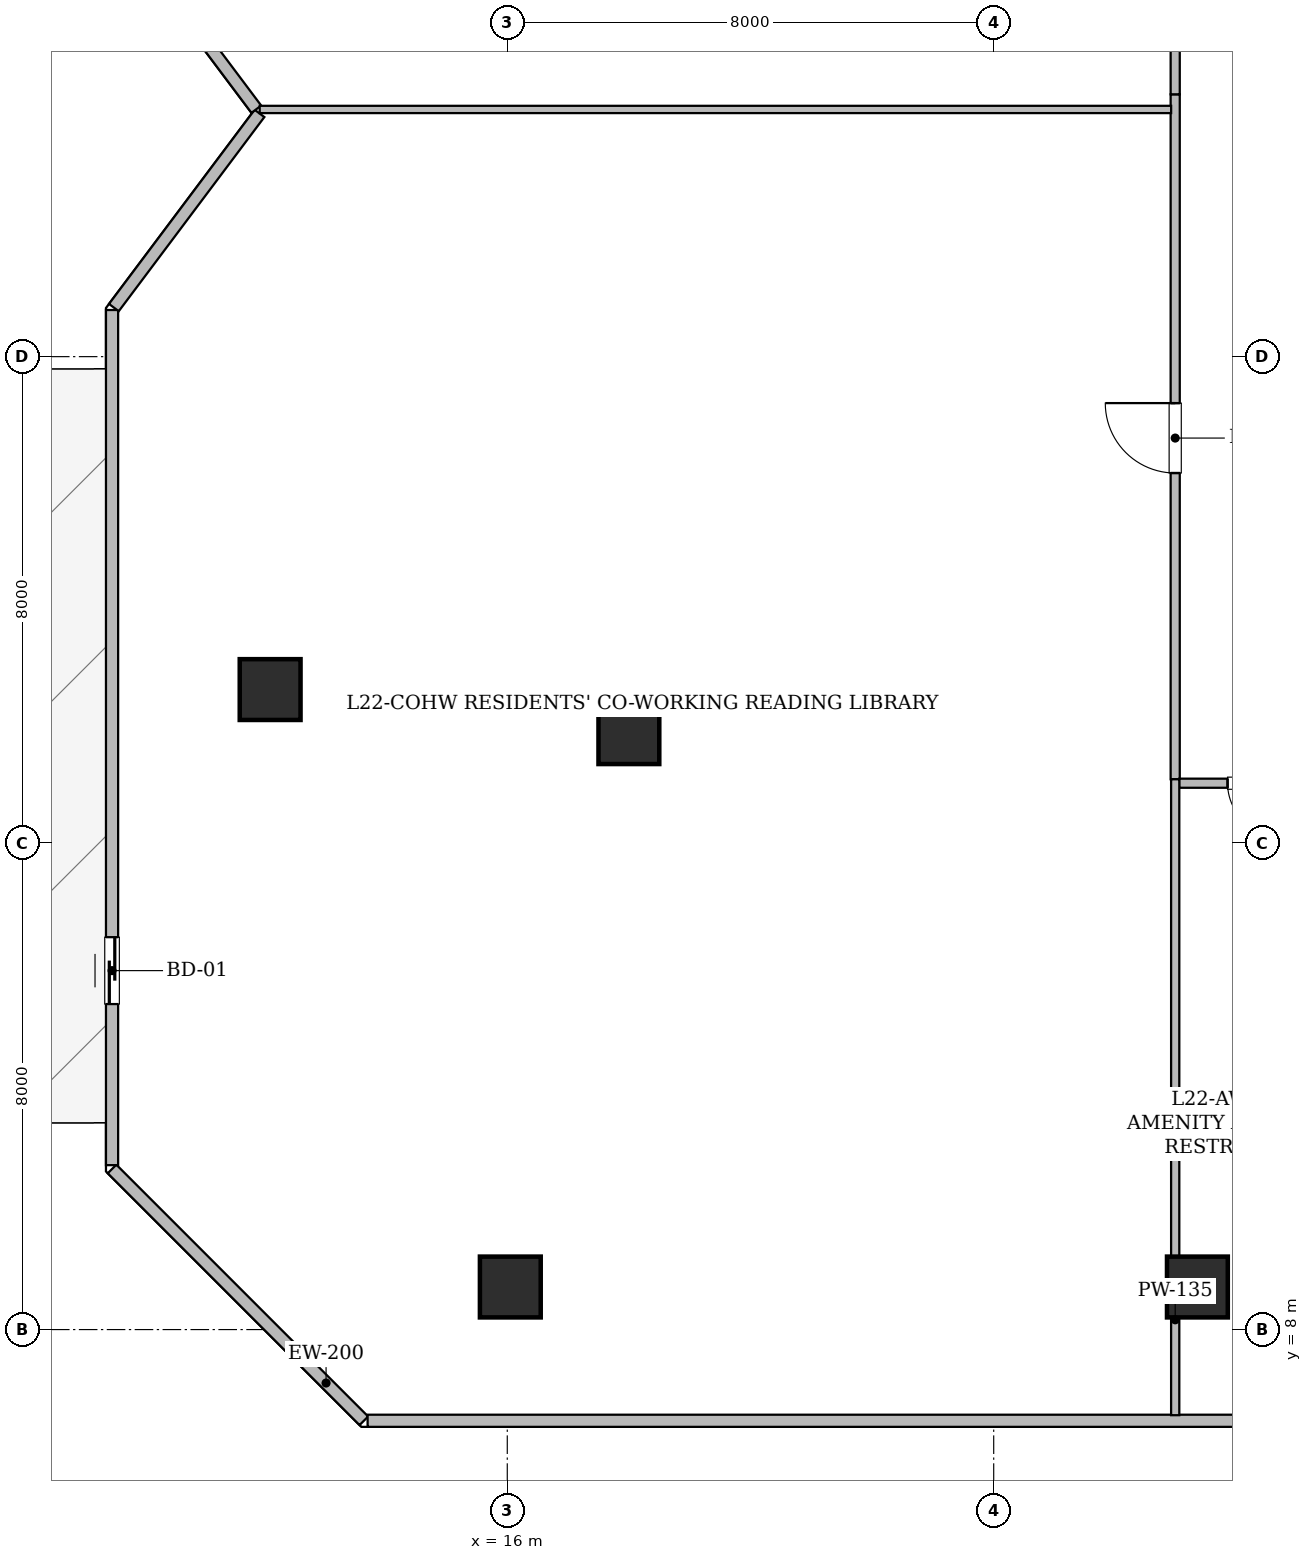
"""IFC4 building model, lengths in metres.
Left out: names, types, materials, properties, quantities, classifications, styles, units other than length and angle.
Written with IfcOpenShell. Run it as: python <this file> out.ifc"""

import sys

from ifc_helpers import new_model, si_unit, direction, frame, frame_2d, origin, origin_2d, place, context, subcontext, project, spatial, rectangle, hollow_rectangle, extrude, element, fill, save


model = new_model("IFC4")
c1 = context("Model", 3, precision=1e-05, world=origin(), true_north=direction((0.0, 1.0)))
c2 = subcontext(c1, "Body", "Model", "MODEL_VIEW")
j1 = project(units=[si_unit("LENGTHUNIT", "METRE"), si_unit("PLANEANGLEUNIT", "RADIAN")], contexts=[c1])
p1 = place(None, origin())
s1 = spatial("IfcSite", under=j1, at=p1, CompositionType="ELEMENT")
p2 = place(p1, origin())
s2 = spatial("IfcBuilding", under=s1, at=p2, CompositionType="ELEMENT")
p3 = place(p2, frame((0.0, 0.0, 89.8)))
s3 = spatial("IfcBuildingStorey", under=s2, at=p3, CompositionType="ELEMENT", Elevation=89.8)
for number, where, z_axis, x_axis in (
    (1, (16.05, 8.7, 0.025), (0.0, 0.0, 1.0), (1.0, 0.0, 0.0)),
    (2, (27.35, 8.7, 0.025), (0.0, 0.0, 1.0), (1.0, 0.0, 0.0)),
    (3, (12.1, 18.525, 0.025), (0.0, 0.0, 1.0), (1.0, 0.0, 0.0)),
):
    element("IfcColumn", number, at=place(p3, frame(where, z_axis=z_axis, x_axis=x_axis)), inside=s3, PredefinedType="COLUMN", context=c2, shape_type="SweptSolid", body=[
        extrude(hollow_rectangle(XDim=1.0, YDim=1.0, WallThickness=0.05, at=origin_2d()), origin(), (0.0, 0.0, 1.0), 4.775),
    ])
p4 = place(p3, frame((18.0, 17.8, 0.0), z_axis=(0.0, 0.0, 1.0), x_axis=(1.0, 0.0, 0.0)))
e4 = element("IfcColumn", 4, at=p4, inside=s3, PredefinedType="COLUMN", context=c2, shape_type="SweptSolid", body=[
    extrude(hollow_rectangle(XDim=1.0, YDim=1.0, WallThickness=0.05, at=origin_2d()), origin(), (0.0, 0.0, 1.0), 4.8),
])
p5 = place(p3, frame((13.641, 6.5, 0.0), z_axis=(0.0, 0.0, 1.0), x_axis=(-0.707106781187, 0.707106781187, 0.0)))
e5 = element("IfcWall", 5, at=p5, inside=s3, PredefinedType="STANDARD", context=c2, shape_type="SweptSolid", body=[
    extrude(rectangle(XDim=5.856, YDim=0.2, at=frame_2d((2.928, 0.0))), origin(), (0.0, 0.0, 1.0), 4.58),
])
p6 = place(p3, frame((9.5, 10.704, 0.0), z_axis=(0.0, 0.0, 1.0), x_axis=(0.0, 1.0, 0.0)))
e6 = element("IfcWall", 6, at=p6, inside=s3, PredefinedType="STANDARD", context=c2, shape_type="SweptSolid", body=[
    extrude(rectangle(XDim=14.063, YDim=0.2, at=frame_2d((7.031, 0.0))), origin(), (0.0, 0.0, 1.0), 4.58),
])
p7 = place(p6, frame((2.649, 0.0, 0.0)))
e7 = element("IfcOpeningElement", 7, at=p7, cuts=e6, PredefinedType="OPENING", context=c2, shape_type="SweptSolid", body=[
    extrude(rectangle(XDim=1.1, YDim=2.2, at=frame_2d((0.55, 1.1))), frame((0.0, 0.11, 0.0), z_axis=(0.0, -1.0, 0.0), x_axis=(1.0, 0.0, 0.0)), (0.0, 0.0, 1.0), 0.22),
])
p8 = place(p3, frame((9.53, 24.807, 0.0), z_axis=(0.0, 0.0, 1.0), x_axis=(0.600029358831, 0.799977980035, 0.0)))
e8 = element("IfcWall", 8, at=p8, inside=s3, PredefinedType="STANDARD", context=c2, shape_type="SweptSolid", body=[
    extrude(rectangle(XDim=3.991, YDim=0.2, at=frame_2d((1.996, 0.0))), origin(), (0.0, 0.0, 1.0), 4.58),
])
p9 = place(p3, frame((11.873, 28.069, 0.0), z_axis=(0.0, 0.0, 1.0), x_axis=(-0.600029630681, 0.799977776132, 0.0)))
e9 = element("IfcWall", 9, at=p9, inside=s3, PredefinedType="STANDARD", context=c2, shape_type="SweptSolid", body=[
    extrude(rectangle(XDim=3.955, YDim=0.2, at=frame_2d((1.978, 0.0))), origin(), (0.0, 0.0, 1.0), 4.58),
])
p10 = place(p3, frame((52.296, 6.5, 0.0), z_axis=(0.0, 0.0, 1.0), x_axis=(-1.0, 0.0, 0.0)))
e10 = element("IfcWall", 10, at=p10, inside=s3, PredefinedType="STANDARD", context=c2, shape_type="SweptSolid", body=[
    extrude(rectangle(XDim=38.593, YDim=0.2, at=frame_2d((19.296, 0.0))), origin(), (0.0, 0.0, 1.0), 4.58),
])
p11 = place(p10, frame((12.883, 0.0, 0.9)))
e11 = element("IfcOpeningElement", 11, at=p11, cuts=e10, PredefinedType="OPENING", context=c2, shape_type="SweptSolid", body=[
    extrude(rectangle(XDim=1.8, YDim=1.6, at=frame_2d((0.9, 0.8))), frame((0.0, 0.11, 0.0), z_axis=(0.0, -1.0, 0.0), x_axis=(1.0, 0.0, 0.0)), (0.0, 0.0, 1.0), 0.22),
])
p12 = place(p3, frame((26.985, 17.05, 0.0), z_axis=(0.0, 0.0, 1.0), x_axis=(0.0, 1.0, 0.0)))
e12 = element("IfcWall", 12, at=p12, inside=s3, PredefinedType="STANDARD", context=c2, shape_type="SweptSolid", body=[
    extrude(rectangle(XDim=11.264, YDim=0.15, at=frame_2d((5.632, 0.0))), origin(), (0.0, 0.0, 1.0), 3.797),
])
p13 = place(p12, frame((5.036, 0.0, 0.0)))
e13 = element("IfcOpeningElement", 13, at=p13, cuts=e12, PredefinedType="OPENING", context=c2, shape_type="SweptSolid", body=[
    extrude(rectangle(XDim=1.15, YDim=2.2, at=frame_2d((0.575, 1.1))), frame((0.0, 0.085, 0.0), z_axis=(0.0, -1.0, 0.0), x_axis=(1.0, 0.0, 0.0)), (0.0, 0.0, 1.0), 0.17),
])
p14 = place(p3, frame((26.985, 28.314, 0.0), z_axis=(0.0, 0.0, 1.0), x_axis=(0.0, 1.0, 0.0)))
e14 = element("IfcWall", 14, at=p14, inside=s3, PredefinedType="STANDARD", context=c2, shape_type="SweptSolid", body=[
    extrude(rectangle(XDim=10.636, YDim=0.15, at=frame_2d((5.318, 0.0))), origin(), (0.0, 0.0, 1.0), 3.797),
])
p15 = place(p14, frame((4.868, 0.0, 0.0)))
e15 = element("IfcOpeningElement", 15, at=p15, cuts=e14, PredefinedType="OPENING", context=c2, shape_type="SweptSolid", body=[
    extrude(rectangle(XDim=0.9, YDim=2.1, at=frame_2d((0.45, 1.05))), frame((0.0, 0.085, 0.0), z_axis=(0.0, -1.0, 0.0), x_axis=(1.0, 0.0, 0.0)), (0.0, 0.0, 1.0), 0.17),
])
p16 = place(p3, frame((29.534, 16.985, 0.0), z_axis=(0.0, 0.0, 1.0), x_axis=(-1.0, 0.0, 0.0)))
e16 = element("IfcWall", 16, at=p16, inside=s3, PredefinedType="STANDARD", context=c2, shape_type="SweptSolid", body=[
    extrude(rectangle(XDim=2.484, YDim=0.15, at=frame_2d((1.242, 0.0))), origin(), (0.0, 0.0, 1.0), 3.797),
])
p17 = place(p16, frame((0.838, 0.0, 0.0)))
e17 = element("IfcOpeningElement", 17, at=p17, cuts=e16, PredefinedType="OPENING", context=c2, shape_type="SweptSolid", body=[
    extrude(rectangle(XDim=0.85, YDim=2.1, at=frame_2d((0.425, 1.05))), frame((0.0, 0.085, 0.0), z_axis=(0.0, -1.0, 0.0), x_axis=(1.0, 0.0, 0.0)), (0.0, 0.0, 1.0), 0.17),
])
p18 = place(p3, frame((11.928, 28.065, 0.0), z_axis=(0.0, 0.0, 1.0), x_axis=(1.0, 0.0, 0.0)))
e18 = element("IfcWall", 18, at=p18, inside=s3, PredefinedType="PARTITIONING", context=c2, shape_type="SweptSolid", body=[
    extrude(rectangle(XDim=14.99, YDim=0.12, at=frame_2d((7.495, 0.0))), origin(), (0.0, 0.0, 1.0), 3.797),
])
p19 = place(p3, frame((26.985, 17.05, 0.0), z_axis=(0.0, 0.0, 1.0), x_axis=(0.0, -1.0, 0.0)))
e19 = element("IfcWall", 19, at=p19, inside=s3, PredefinedType="PARTITIONING", context=c2, shape_type="SweptSolid", body=[
    extrude(rectangle(XDim=10.458, YDim=0.135, at=frame_2d((5.229, 0.0))), origin(), (0.0, 0.0, 1.0), 3.797),
])
p20 = place(p7, origin())
e20 = element("IfcDoor", 20, at=p20, inside=s3, OperationType="SLIDING_TO_LEFT", PredefinedType="DOOR", context=c2, shape_type="SweptSolid", body=[
    extrude(rectangle(XDim=1.1, YDim=2.2, at=frame_2d((0.55, 1.1))), frame((0.0, 0.025, 0.0), z_axis=(0.0, -1.0, 0.0), x_axis=(1.0, 0.0, 0.0)), (0.0, 0.0, 1.0), 0.05),
])
fill(e7, e20)
p21 = place(p13, origin())
e21 = element("IfcDoor", 21, at=p21, inside=s3, OperationType="SINGLE_SWING_RIGHT", PredefinedType="DOOR", context=c2, shape_type="SweptSolid", body=[
    extrude(rectangle(XDim=1.15, YDim=2.2, at=frame_2d((0.575, 1.1))), frame((0.0, 0.025, 0.0), z_axis=(0.0, -1.0, 0.0), x_axis=(1.0, 0.0, 0.0)), (0.0, 0.0, 1.0), 0.05),
])
fill(e13, e21)
p22 = place(p17, origin())
e22 = element("IfcDoor", 22, at=p22, inside=s3, OperationType="SINGLE_SWING_LEFT", PredefinedType="DOOR", context=c2, shape_type="SweptSolid", body=[
    extrude(rectangle(XDim=0.85, YDim=2.1, at=frame_2d((0.425, 1.05))), frame((0.0, 0.025, 0.0), z_axis=(0.0, -1.0, 0.0), x_axis=(1.0, 0.0, 0.0)), (0.0, 0.0, 1.0), 0.05),
])
fill(e17, e22)
save(model, sys.argv[1])
